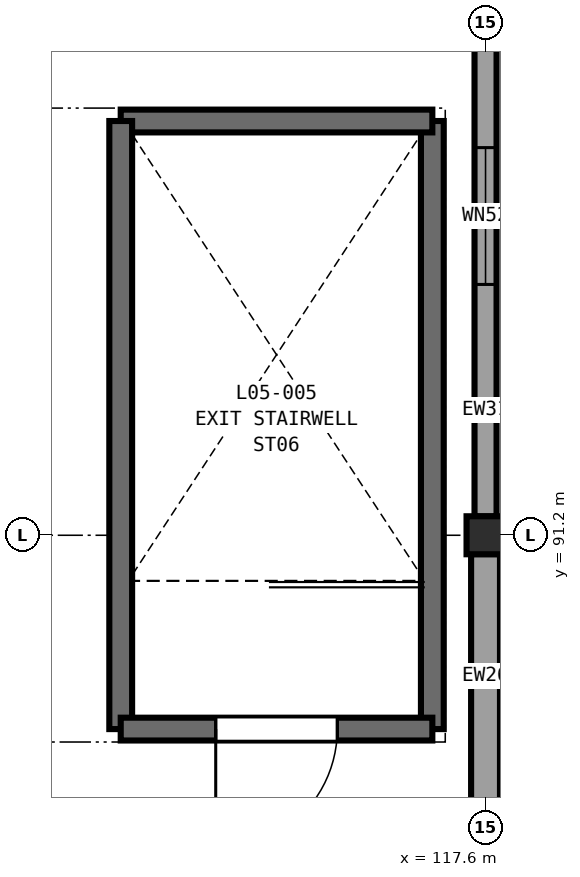
"""IFC4 building model, lengths in metres.
Left out: names, types, materials, properties, quantities, classifications, styles, units other than length and angle.
Written with IfcOpenShell. Run it as: python <this file> out.ifc"""

import sys

from ifc_helpers import new_model, si_unit, direction, frame, frame_2d, origin, origin_2d, place, context, subcontext, project, spatial, rectangle, extrude, element, fill, save


model = new_model("IFC4")
c1 = context("Model", 3, precision=1e-05, world=origin(), true_north=direction((0.0, 1.0)))
c2 = subcontext(c1, "Body", "Model", "MODEL_VIEW")
j1 = project(units=[si_unit("LENGTHUNIT", "METRE"), si_unit("PLANEANGLEUNIT", "RADIAN")], contexts=[c1])
p1 = place(None, origin())
s1 = spatial("IfcSite", under=j1, at=p1, CompositionType="ELEMENT")
p2 = place(p1, origin())
s2 = spatial("IfcBuilding", under=s1, at=p2, CompositionType="ELEMENT")
p3 = place(p2, frame((0.0, 0.0, 24.6)))
s3 = spatial("IfcBuildingStorey", under=s2, at=p3, CompositionType="ELEMENT", Elevation=24.6)
p4 = place(p3, frame((117.6, 91.2, 0.0), z_axis=(0.0, 0.0, 1.0), x_axis=(1.0, 0.0, 0.0)))
e1 = element("IfcColumn", 1, at=p4, inside=s3, PredefinedType="COLUMN", context=c2, shape_type="SweptSolid", body=[
    extrude(rectangle(XDim=0.5, YDim=0.5, at=origin_2d()), origin(), (0.0, 0.0, 1.0), 4.2),
])
p5 = place(p3, frame((117.6, 99.352, 0.0), z_axis=(0.0, 0.0, 1.0), x_axis=(0.0, -1.0, 0.0)))
e2 = element("IfcWall", 2, at=p5, inside=s3, PredefinedType="SOLIDWALL", context=c2, shape_type="SweptSolid", body=[
    extrude(rectangle(XDim=7.904, YDim=0.29, at=frame_2d((3.952, 0.0))), origin(), (0.0, 0.0, 1.0), 3.48),
])
p6 = place(p5, frame((3.052, 0.0, 0.9)))
e3 = element("IfcOpeningElement", 3, at=p6, cuts=e2, PredefinedType="OPENING", context=c2, shape_type="SweptSolid", body=[
    extrude(rectangle(XDim=1.8, YDim=1.55, at=frame_2d((0.9, 0.775))), frame((0.0, 0.155, 0.0), z_axis=(0.0, -1.0, 0.0), x_axis=(1.0, 0.0, 0.0)), (0.0, 0.0, 1.0), 0.31),
])
p7 = place(p3, frame((117.6, 90.952, 0.0), z_axis=(0.0, 0.0, 1.0), x_axis=(0.0, -1.0, 0.0)))
e4 = element("IfcWall", 4, at=p7, inside=s3, PredefinedType="SOLIDWALL", context=c2, shape_type="SweptSolid", body=[
    extrude(rectangle(XDim=7.904, YDim=0.38, at=frame_2d((3.952, 0.0))), origin(), (0.0, 0.0, 1.0), 3.48),
])
p8 = place(p7, frame((3.452, 0.0, 0.9)))
e5 = element("IfcOpeningElement", 5, at=p8, cuts=e4, PredefinedType="OPENING", context=c2, shape_type="SweptSolid", body=[
    extrude(rectangle(XDim=1.0, YDim=1.75, at=frame_2d((0.5, 0.875))), frame((0.0, 0.2, 0.0), z_axis=(0.0, -1.0, 0.0), x_axis=(1.0, 0.0, 0.0)), (0.0, 0.0, 1.0), 0.4),
])
p9 = place(p3, frame((116.9, 88.65, 0.0), z_axis=(0.0, 0.0, 1.0), x_axis=(0.0, 1.0, 0.0)))
e6 = element("IfcWall", 6, at=p9, inside=s3, PredefinedType="SHEAR", context=c2, shape_type="SweptSolid", body=[
    extrude(rectangle(XDim=8.0, YDim=0.3, at=frame_2d((4.0, 0.0))), origin(), (0.0, 0.0, 1.0), 4.2),
])
p10 = place(p3, frame((116.9, 96.65, 0.0), z_axis=(0.0, 0.0, 1.0), x_axis=(-1.0, 0.0, 0.0)))
e7 = element("IfcWall", 7, at=p10, inside=s3, PredefinedType="SHEAR", context=c2, shape_type="SweptSolid", body=[
    extrude(rectangle(XDim=4.1, YDim=0.3, at=frame_2d((2.05, 0.0))), origin(), (0.0, 0.0, 1.0), 4.2),
])
p11 = place(p3, frame((112.8, 96.65, 0.0), z_axis=(0.0, 0.0, 1.0), x_axis=(0.0, -1.0, 0.0)))
e8 = element("IfcWall", 8, at=p11, inside=s3, PredefinedType="SHEAR", context=c2, shape_type="SweptSolid", body=[
    extrude(rectangle(XDim=8.0, YDim=0.3, at=frame_2d((4.0, 0.0))), origin(), (0.0, 0.0, 1.0), 4.2),
])
p12 = place(p3, frame((112.8, 88.65, 0.0), z_axis=(0.0, 0.0, 1.0), x_axis=(1.0, 0.0, 0.0)))
e9 = element("IfcWall", 9, at=p12, inside=s3, PredefinedType="SHEAR", context=c2, shape_type="SweptSolid", body=[
    extrude(rectangle(XDim=4.1, YDim=0.3, at=frame_2d((2.05, 0.0))), origin(), (0.0, 0.0, 1.0), 4.2),
])
p13 = place(p12, frame((1.25, 0.0, 0.0)))
e10 = element("IfcOpeningElement", 10, at=p13, cuts=e9, PredefinedType="OPENING", context=c2, shape_type="SweptSolid", body=[
    extrude(rectangle(XDim=1.6, YDim=2.25, at=frame_2d((0.8, 1.125))), frame((0.0, 0.16, 0.0), z_axis=(0.0, -1.0, 0.0), x_axis=(1.0, 0.0, 0.0)), (0.0, 0.0, 1.0), 0.32),
])
p14 = place(p6, origin())
e11 = element("IfcWindow", 11, at=p14, inside=s3, PartitioningType="DOUBLE_PANEL_VERTICAL", PredefinedType="WINDOW", context=c2, shape_type="SweptSolid", body=[
    extrude(rectangle(XDim=1.8, YDim=1.55, at=frame_2d((0.9, 0.775))), frame((0.0, 0.03, 0.0), z_axis=(0.0, -1.0, 0.0), x_axis=(1.0, 0.0, 0.0)), (0.0, 0.0, 1.0), 0.06),
])
fill(e3, e11)
p15 = place(p13, frame((1.6, 0.0, 0.0), z_axis=(0.0, 0.0, 1.0), x_axis=(-1.0, 0.0, 0.0)))
e12 = element("IfcDoor", 12, at=p15, inside=s3, OperationType="SINGLE_SWING_RIGHT", PredefinedType="DOOR", context=c2, shape_type="SweptSolid", body=[
    extrude(rectangle(XDim=1.6, YDim=2.25, at=frame_2d((0.8, 1.125))), frame((0.0, 0.025, 0.0), z_axis=(0.0, -1.0, 0.0), x_axis=(1.0, 0.0, 0.0)), (0.0, 0.0, 1.0), 0.05),
])
fill(e10, e12)
save(model, sys.argv[1])
